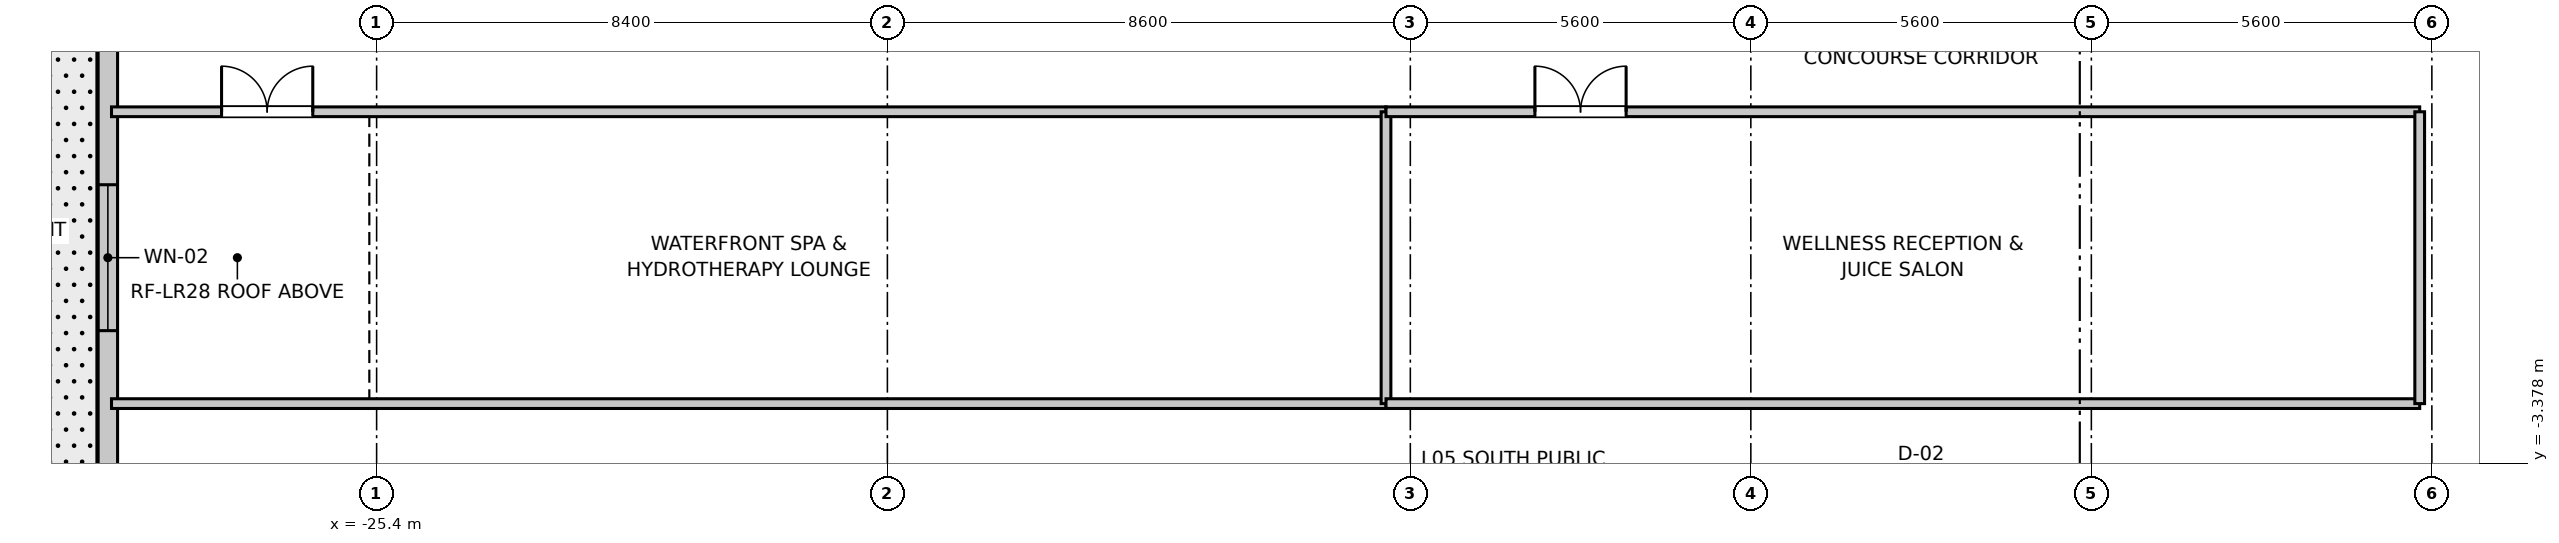
"""IFC4 building model, lengths in metres.
Left out: names, types, materials, properties, quantities, classifications, styles, units other than length and angle.
Written with IfcOpenShell. Run it as: python <this file> out.ifc"""

import sys

from ifc_helpers import new_model, si_unit, direction, frame, frame_2d, origin, place, context, subcontext, project, spatial, rectangle, extrude, source, transform, mapped, element, fill, save


model = new_model("IFC4")
c1 = context("Model", 3, precision=1e-05, world=origin(), true_north=direction((0.0, 1.0)))
c2 = subcontext(c1, "Body", "Model", "MODEL_VIEW")
j1 = project(units=[si_unit("LENGTHUNIT", "METRE"), si_unit("PLANEANGLEUNIT", "RADIAN")], contexts=[c1])
p1 = place(None, origin())
s1 = spatial("IfcSite", under=j1, at=p1, CompositionType="ELEMENT")
p2 = place(p1, origin())
s2 = spatial("IfcBuilding", under=s1, at=p2, CompositionType="ELEMENT")
p3 = place(p2, frame((0.0, 0.0, 27.0)))
s3 = spatial("IfcBuildingStorey", under=s2, at=p3, CompositionType="ELEMENT", Elevation=27.0)
m1 = source(origin(), c2, "Body", "SweptSolid", [
    extrude(rectangle(XDim=33.64, YDim=0.32, at=frame_2d((16.82, 0.0))), origin(), (0.0, 0.0, 1.0), 5.12),
])
p4 = place(p3, frame((-29.82, -16.82, 0.0), z_axis=(0.0, 0.0, 1.0), x_axis=(0.0, 1.0, 0.0)))
e1 = element("IfcWall", 1, at=p4, inside=s3, PredefinedType="STANDARD", context=c2, shape_type="MappedRepresentation", body=[
    mapped(m1, transform((0.0, 0.0, 0.0), scale=1.0)),
])
p5 = place(p4, frame((7.82, 0.0, 0.0)))
e2 = element("IfcOpeningElement", 2, at=p5, cuts=e1, PredefinedType="OPENING", context=c2, shape_type="SweptSolid", body=[
    extrude(rectangle(XDim=2.0, YDim=2.35, at=frame_2d((1.0, 1.175))), frame((0.0, 0.17, 0.0), z_axis=(0.0, -1.0, 0.0), x_axis=(1.0, 0.0, 0.0)), (0.0, 0.0, 1.0), 0.34),
])
p6 = place(p4, frame((23.82, 0.0, 0.0)))
e3 = element("IfcOpeningElement", 3, at=p6, cuts=e1, PredefinedType="OPENING", context=c2, shape_type="SweptSolid", body=[
    extrude(rectangle(XDim=2.0, YDim=2.35, at=frame_2d((1.0, 1.175))), frame((0.0, 0.17, 0.0), z_axis=(0.0, -1.0, 0.0), x_axis=(1.0, 0.0, 0.0)), (0.0, 0.0, 1.0), 0.34),
])
p7 = place(p4, frame((15.62, 0.0, 0.9)))
e4 = element("IfcOpeningElement", 4, at=p7, cuts=e1, PredefinedType="OPENING", context=c2, shape_type="SweptSolid", body=[
    extrude(rectangle(XDim=2.4, YDim=2.2, at=frame_2d((1.2, 1.1))), frame((0.0, 0.17, 0.0), z_axis=(0.0, -1.0, 0.0), x_axis=(1.0, 0.0, 0.0)), (0.0, 0.0, 1.0), 0.34),
])
m2 = source(origin(), c2, "Body", "SweptSolid", [
    extrude(rectangle(XDim=20.96, YDim=0.16, at=frame_2d((10.48, 0.0))), origin(), (0.0, 0.0, 1.0), 3.24),
])
p8 = place(p3, frame((-29.76, -2.4, 0.0), z_axis=(0.0, 0.0, 1.0), x_axis=(1.0, 0.0, 0.0)))
e5 = element("IfcWall", 5, at=p8, inside=s3, PredefinedType="PARTITIONING", context=c2, shape_type="MappedRepresentation", body=[
    mapped(m2, transform((0.0, 0.0, 0.0), scale=1.0)),
])
p9 = place(p3, frame((-29.76, 2.4, 0.0), z_axis=(0.0, 0.0, 1.0), x_axis=(1.0, 0.0, 0.0)))
e6 = element("IfcWall", 6, at=p9, inside=s3, PredefinedType="PARTITIONING", context=c2, shape_type="MappedRepresentation", body=[
    mapped(m2, transform((0.0, 0.0, 0.0), scale=1.0)),
])
p10 = place(p9, frame((1.81, 0.0, 0.0)))
e7 = element("IfcOpeningElement", 7, at=p10, cuts=e6, PredefinedType="OPENING", context=c2, shape_type="SweptSolid", body=[
    extrude(rectangle(XDim=1.5, YDim=2.15, at=frame_2d((0.75, 1.075))), frame((0.0, 0.09, 0.0), z_axis=(0.0, -1.0, 0.0), x_axis=(1.0, 0.0, 0.0)), (0.0, 0.0, 1.0), 0.18),
])
m3 = source(origin(), c2, "Body", "SweptSolid", [
    extrude(rectangle(XDim=4.8, YDim=0.16, at=frame_2d((2.4, 0.0))), origin(), (0.0, 0.0, 1.0), 3.24),
])
p11 = place(p3, frame((-8.8, -2.4, 0.0), z_axis=(0.0, 0.0, 1.0), x_axis=(0.0, 1.0, 0.0)))
e8 = element("IfcWall", 8, at=p11, inside=s3, PredefinedType="PARTITIONING", context=c2, shape_type="MappedRepresentation", body=[
    mapped(m3, transform((0.0, 0.0, 0.0), scale=1.0)),
])
m4 = source(origin(), c2, "Body", "SweptSolid", [
    extrude(rectangle(XDim=17.0, YDim=0.16, at=frame_2d((8.5, 0.0))), origin(), (0.0, 0.0, 1.0), 3.24),
])
p12 = place(p3, frame((-8.8, -2.4, 0.0), z_axis=(0.0, 0.0, 1.0), x_axis=(1.0, 0.0, 0.0)))
e9 = element("IfcWall", 9, at=p12, inside=s3, PredefinedType="PARTITIONING", context=c2, shape_type="MappedRepresentation", body=[
    mapped(m4, transform((0.0, 0.0, 0.0), scale=1.0)),
])
p13 = place(p3, frame((-8.8, 2.4, 0.0), z_axis=(0.0, 0.0, 1.0), x_axis=(1.0, 0.0, 0.0)))
e10 = element("IfcWall", 10, at=p13, inside=s3, PredefinedType="PARTITIONING", context=c2, shape_type="MappedRepresentation", body=[
    mapped(m4, transform((0.0, 0.0, 0.0), scale=1.0)),
])
p14 = place(p13, frame((2.449, 0.0, 0.0)))
e11 = element("IfcOpeningElement", 11, at=p14, cuts=e10, PredefinedType="OPENING", context=c2, shape_type="SweptSolid", body=[
    extrude(rectangle(XDim=1.5, YDim=2.15, at=frame_2d((0.75, 1.075))), frame((0.0, 0.09, 0.0), z_axis=(0.0, -1.0, 0.0), x_axis=(1.0, 0.0, 0.0)), (0.0, 0.0, 1.0), 0.18),
])
p15 = place(p3, frame((8.2, -2.4, 0.0), z_axis=(0.0, 0.0, 1.0), x_axis=(0.0, 1.0, 0.0)))
e12 = element("IfcWall", 12, at=p15, inside=s3, PredefinedType="PARTITIONING", context=c2, shape_type="MappedRepresentation", body=[
    mapped(m3, transform((0.0, 0.0, 0.0), scale=1.0)),
])
m5 = source(origin(), c2, "Body", "SweptSolid", [
    extrude(rectangle(XDim=2.4, YDim=2.2, at=frame_2d((1.2, 1.1))), frame((0.0, 0.03, 0.0), z_axis=(0.0, -1.0, 0.0), x_axis=(1.0, 0.0, 0.0)), (0.0, 0.0, 1.0), 0.06),
])
p16 = place(p7, origin())
e13 = element("IfcWindow", 13, at=p16, inside=s3, PartitioningType="SINGLE_PANEL", PredefinedType="WINDOW", context=c2, shape_type="MappedRepresentation", body=[
    mapped(m5, transform((0.0, 0.0, 0.0), scale=1.0)),
])
fill(e4, e13)
m6 = source(origin(), c2, "Body", "SweptSolid", [
    extrude(rectangle(XDim=1.5, YDim=2.15, at=frame_2d((0.75, 1.075))), frame((0.0, 0.025, 0.0), z_axis=(0.0, -1.0, 0.0), x_axis=(1.0, 0.0, 0.0)), (0.0, 0.0, 1.0), 0.05),
])
p17 = place(p10, frame((1.5, 0.0, 0.0), z_axis=(0.0, 0.0, 1.0), x_axis=(-1.0, 0.0, 0.0)))
e14 = element("IfcDoor", 14, at=p17, inside=s3, OperationType="DOUBLE_DOOR_SINGLE_SWING", PredefinedType="DOOR", context=c2, shape_type="MappedRepresentation", body=[
    mapped(m6, transform((0.0, 0.0, 0.0), scale=1.0)),
])
fill(e7, e14)
p18 = place(p14, frame((1.5, 0.0, 0.0), z_axis=(0.0, 0.0, 1.0), x_axis=(-1.0, 0.0, 0.0)))
e15 = element("IfcDoor", 15, at=p18, inside=s3, OperationType="DOUBLE_DOOR_SINGLE_SWING", PredefinedType="DOOR", context=c2, shape_type="MappedRepresentation", body=[
    mapped(m6, transform((0.0, 0.0, 0.0), scale=1.0)),
])
fill(e11, e15)
save(model, sys.argv[1])
